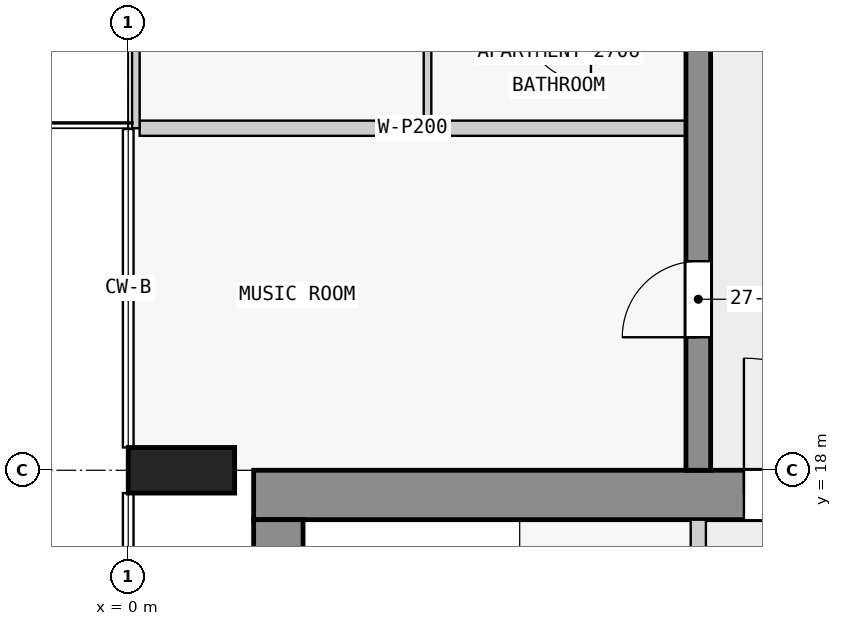
"""IFC4 building model, lengths in metres.
Left out: names, types, materials, properties, quantities, classifications, styles, units other than length and angle.
Written with IfcOpenShell. Run it as: python <this file> out.ifc"""

import sys

from ifc_helpers import new_model, si_unit, direction, frame, frame_2d, origin, origin_2d, place, context, subcontext, project, spatial, rectangle, extrude, element, fill, save


model = new_model("IFC4")
c1 = context("Model", 3, precision=1e-05, world=origin(), true_north=direction((0.0, 1.0)))
c2 = subcontext(c1, "Body", "Model", "MODEL_VIEW")
j1 = project(units=[si_unit("LENGTHUNIT", "METRE"), si_unit("PLANEANGLEUNIT", "RADIAN")], contexts=[c1])
p1 = place(None, origin())
s1 = spatial("IfcSite", under=j1, at=p1, CompositionType="ELEMENT")
p2 = place(p1, origin())
s2 = spatial("IfcBuilding", under=s1, at=p2, CompositionType="ELEMENT")
p3 = place(p2, frame((0.0, 0.0, 106.3)))
s3 = spatial("IfcBuildingStorey", under=s2, at=p3, CompositionType="ELEMENT", Elevation=106.3)
p4 = place(p3, frame((0.7, 18.0, 0.0), z_axis=(0.0, 0.0, 1.0), x_axis=(0.0, 1.0, 0.0)))
e1 = element("IfcColumn", 1, at=p4, inside=s3, PredefinedType="COLUMN", context=c2, shape_type="SweptSolid", body=[
    extrude(rectangle(XDim=0.6, YDim=1.4, at=origin_2d()), origin(), (0.0, 0.0, 1.0), 3.5),
])
p5 = place(p3, frame((1.65, 17.675, 0.0), z_axis=(0.0, 0.0, 1.0), x_axis=(1.0, 0.0, 0.0)))
e2 = element("IfcWall", 2, at=p5, inside=s3, PredefinedType="SHEAR", context=c2, shape_type="SweptSolid", body=[
    extrude(rectangle(XDim=20.85, YDim=0.65, at=frame_2d((10.425, 0.0))), origin(), (0.0, 0.0, 1.0), 3.25),
])
p6 = place(p5, frame((6.45, 0.0, 0.0)))
e3 = element("IfcOpeningElement", 3, at=p6, cuts=e2, PredefinedType="OPENING", context=c2, shape_type="SweptSolid", body=[
    extrude(rectangle(XDim=1.8, YDim=2.1, at=frame_2d((0.9, 1.05))), frame((0.0, 0.335, 0.0), z_axis=(0.0, -1.0, 0.0), x_axis=(1.0, 0.0, 0.0)), (0.0, 0.0, 1.0), 0.67),
])
p7 = place(p3, frame((1.975, 2.5, 0.0), z_axis=(0.0, 0.0, 1.0), x_axis=(0.0, 1.0, 0.0)))
e4 = element("IfcWall", 4, at=p7, inside=s3, PredefinedType="SHEAR", context=c2, shape_type="SweptSolid", body=[
    extrude(rectangle(XDim=14.85, YDim=0.65, at=frame_2d((7.425, 0.0))), origin(), (0.0, 0.0, 1.0), 3.25),
])
p8 = place(p3, frame((7.5, 18.0, 0.0), z_axis=(0.0, 0.0, 1.0), x_axis=(0.0, 1.0, 0.0)))
e5 = element("IfcWall", 5, at=p8, inside=s3, PredefinedType="SHEAR", context=c2, shape_type="SweptSolid", body=[
    extrude(rectangle(XDim=27.0, YDim=0.325, at=frame_2d((13.5, 0.0))), origin(), (0.0, 0.0, 1.0), 3.25),
])
p9 = place(p8, frame((1.75, 0.0, 0.0)))
e6 = element("IfcOpeningElement", 6, at=p9, cuts=e5, PredefinedType="OPENING", context=c2, shape_type="SweptSolid", body=[
    extrude(rectangle(XDim=1.0, YDim=2.1, at=frame_2d((0.5, 1.05))), frame((0.0, 0.172, 0.0), z_axis=(0.0, -1.0, 0.0), x_axis=(1.0, 0.0, 0.0)), (0.0, 0.0, 1.0), 0.345),
])
p10 = place(p8, frame((6.25, 0.0, 0.0)))
e7 = element("IfcOpeningElement", 7, at=p10, cuts=e5, PredefinedType="OPENING", context=c2, shape_type="SweptSolid", body=[
    extrude(rectangle(XDim=1.0, YDim=2.1, at=frame_2d((0.5, 1.05))), frame((0.0, 0.172, 0.0), z_axis=(0.0, -1.0, 0.0), x_axis=(1.0, 0.0, 0.0)), (0.0, 0.0, 1.0), 0.345),
])
p11 = place(p8, frame((10.75, 0.0, 0.0)))
e8 = element("IfcOpeningElement", 8, at=p11, cuts=e5, PredefinedType="OPENING", context=c2, shape_type="SweptSolid", body=[
    extrude(rectangle(XDim=1.0, YDim=2.1, at=frame_2d((0.5, 1.05))), frame((0.0, 0.172, 0.0), z_axis=(0.0, -1.0, 0.0), x_axis=(1.0, 0.0, 0.0)), (0.0, 0.0, 1.0), 0.345),
])
p12 = place(p8, frame((15.25, 0.0, 0.0)))
e9 = element("IfcOpeningElement", 9, at=p12, cuts=e5, PredefinedType="OPENING", context=c2, shape_type="SweptSolid", body=[
    extrude(rectangle(XDim=1.0, YDim=2.1, at=frame_2d((0.5, 1.05))), frame((0.0, 0.172, 0.0), z_axis=(0.0, -1.0, 0.0), x_axis=(1.0, 0.0, 0.0)), (0.0, 0.0, 1.0), 0.345),
])
p13 = place(p8, frame((19.75, 0.0, 0.0)))
e10 = element("IfcOpeningElement", 10, at=p13, cuts=e5, PredefinedType="OPENING", context=c2, shape_type="SweptSolid", body=[
    extrude(rectangle(XDim=1.0, YDim=2.1, at=frame_2d((0.5, 1.05))), frame((0.0, 0.172, 0.0), z_axis=(0.0, -1.0, 0.0), x_axis=(1.0, 0.0, 0.0)), (0.0, 0.0, 1.0), 0.345),
])
p14 = place(p8, frame((23.25, 0.0, 0.0)))
e11 = element("IfcOpeningElement", 11, at=p14, cuts=e5, PredefinedType="OPENING", context=c2, shape_type="SweptSolid", body=[
    extrude(rectangle(XDim=0.9, YDim=2.1, at=frame_2d((0.45, 1.05))), frame((0.0, 0.172, 0.0), z_axis=(0.0, -1.0, 0.0), x_axis=(1.0, 0.0, 0.0)), (0.0, 0.0, 1.0), 0.345),
])
p15 = place(p8, frame((25.45, 0.0, 0.0)))
e12 = element("IfcOpeningElement", 12, at=p15, cuts=e5, PredefinedType="OPENING", context=c2, shape_type="SweptSolid", body=[
    extrude(rectangle(XDim=1.0, YDim=2.1, at=frame_2d((0.5, 1.05))), frame((0.0, 0.172, 0.0), z_axis=(0.0, -1.0, 0.0), x_axis=(1.0, 0.0, 0.0)), (0.0, 0.0, 1.0), 0.345),
])
p16 = place(p3, frame((0.1, 22.5, 0.0), z_axis=(0.0, 0.0, 1.0), x_axis=(0.0, 1.0, 0.0)))
e13 = element("IfcWall", 13, at=p16, inside=s3, PredefinedType="STANDARD", context=c2, shape_type="SweptSolid", body=[
    extrude(rectangle(XDim=4.5, YDim=0.1, at=frame_2d((2.25, 0.0))), origin(), (0.0, 0.0, 1.0), 3.25),
])
p17 = place(p16, frame((1.05, 0.0, 0.0)))
e14 = element("IfcOpeningElement", 14, at=p17, cuts=e13, PredefinedType="OPENING", context=c2, shape_type="SweptSolid", body=[
    extrude(rectangle(XDim=2.4, YDim=2.4, at=frame_2d((1.2, 1.2))), frame((0.0, 0.06, 0.0), z_axis=(0.0, -1.0, 0.0), x_axis=(1.0, 0.0, 0.0)), (0.0, 0.0, 1.0), 0.12),
])
p18 = place(p3, frame((7.5, 10.1, 0.0), z_axis=(0.0, 0.0, 1.0), x_axis=(0.0, 1.0, 0.0)))
e15 = element("IfcWall", 15, at=p18, inside=s3, PredefinedType="PARTITIONING", context=c2, shape_type="SweptSolid", body=[
    extrude(rectangle(XDim=7.25, YDim=0.2, at=frame_2d((3.625, 0.0))), origin(), (0.0, 0.0, 1.0), 3.25),
])
p19 = place(p18, frame((0.775, 0.0, 0.0)))
e16 = element("IfcOpeningElement", 16, at=p19, cuts=e15, PredefinedType="OPENING", context=c2, shape_type="SweptSolid", body=[
    extrude(rectangle(XDim=0.9, YDim=2.1, at=frame_2d((0.45, 1.05))), frame((0.0, 0.11, 0.0), z_axis=(0.0, -1.0, 0.0), x_axis=(1.0, 0.0, 0.0)), (0.0, 0.0, 1.0), 0.22),
])
p20 = place(p18, frame((3.225, 0.0, 0.0)))
e17 = element("IfcOpeningElement", 17, at=p20, cuts=e15, PredefinedType="OPENING", context=c2, shape_type="SweptSolid", body=[
    extrude(rectangle(XDim=0.9, YDim=2.1, at=frame_2d((0.45, 1.05))), frame((0.0, 0.11, 0.0), z_axis=(0.0, -1.0, 0.0), x_axis=(1.0, 0.0, 0.0)), (0.0, 0.0, 1.0), 0.22),
])
p21 = place(p18, frame((5.25, 0.0, 0.0)))
e18 = element("IfcOpeningElement", 18, at=p21, cuts=e15, PredefinedType="OPENING", context=c2, shape_type="SweptSolid", body=[
    extrude(rectangle(XDim=0.9, YDim=2.1, at=frame_2d((0.45, 1.05))), frame((0.0, 0.11, 0.0), z_axis=(0.0, -1.0, 0.0), x_axis=(1.0, 0.0, 0.0)), (0.0, 0.0, 1.0), 0.22),
])
p22 = place(p3, frame((7.337, 22.5, 0.0), z_axis=(0.0, 0.0, 1.0), x_axis=(-1.0, 0.0, 0.0)))
e19 = element("IfcWall", 19, at=p22, inside=s3, PredefinedType="PARTITIONING", context=c2, shape_type="SweptSolid", body=[
    extrude(rectangle(XDim=7.188, YDim=0.2, at=frame_2d((3.594, 0.0))), origin(), (0.0, 0.0, 1.0), 3.25),
])
p23 = place(p3, frame((3.938, 23.95, 0.0), z_axis=(0.0, 0.0, 1.0), x_axis=(0.0, -1.0, 0.0)))
e20 = element("IfcWall", 20, at=p23, inside=s3, PredefinedType="PARTITIONING", context=c2, shape_type="SweptSolid", body=[
    extrude(rectangle(XDim=1.35, YDim=0.1, at=frame_2d((0.675, 0.0))), origin(), (0.0, 0.0, 1.0), 3.25),
])
p24 = place(p6, origin())
e21 = element("IfcDoor", 21, at=p24, inside=s3, OperationType="DOUBLE_DOOR_SINGLE_SWING", PredefinedType="DOOR", context=c2, shape_type="SweptSolid", body=[
    extrude(rectangle(XDim=1.8, YDim=2.1, at=frame_2d((0.9, 1.05))), frame((0.0, 0.025, 0.0), z_axis=(0.0, -1.0, 0.0), x_axis=(1.0, 0.0, 0.0)), (0.0, 0.0, 1.0), 0.05),
])
fill(e3, e21)
p25 = place(p9, origin())
e22 = element("IfcDoor", 22, at=p25, inside=s3, OperationType="SINGLE_SWING_LEFT", PredefinedType="DOOR", context=c2, shape_type="SweptSolid", body=[
    extrude(rectangle(XDim=1.0, YDim=2.1, at=frame_2d((0.5, 1.05))), frame((0.0, 0.025, 0.0), z_axis=(0.0, -1.0, 0.0), x_axis=(1.0, 0.0, 0.0)), (0.0, 0.0, 1.0), 0.05),
])
fill(e6, e22)
save(model, sys.argv[1])
